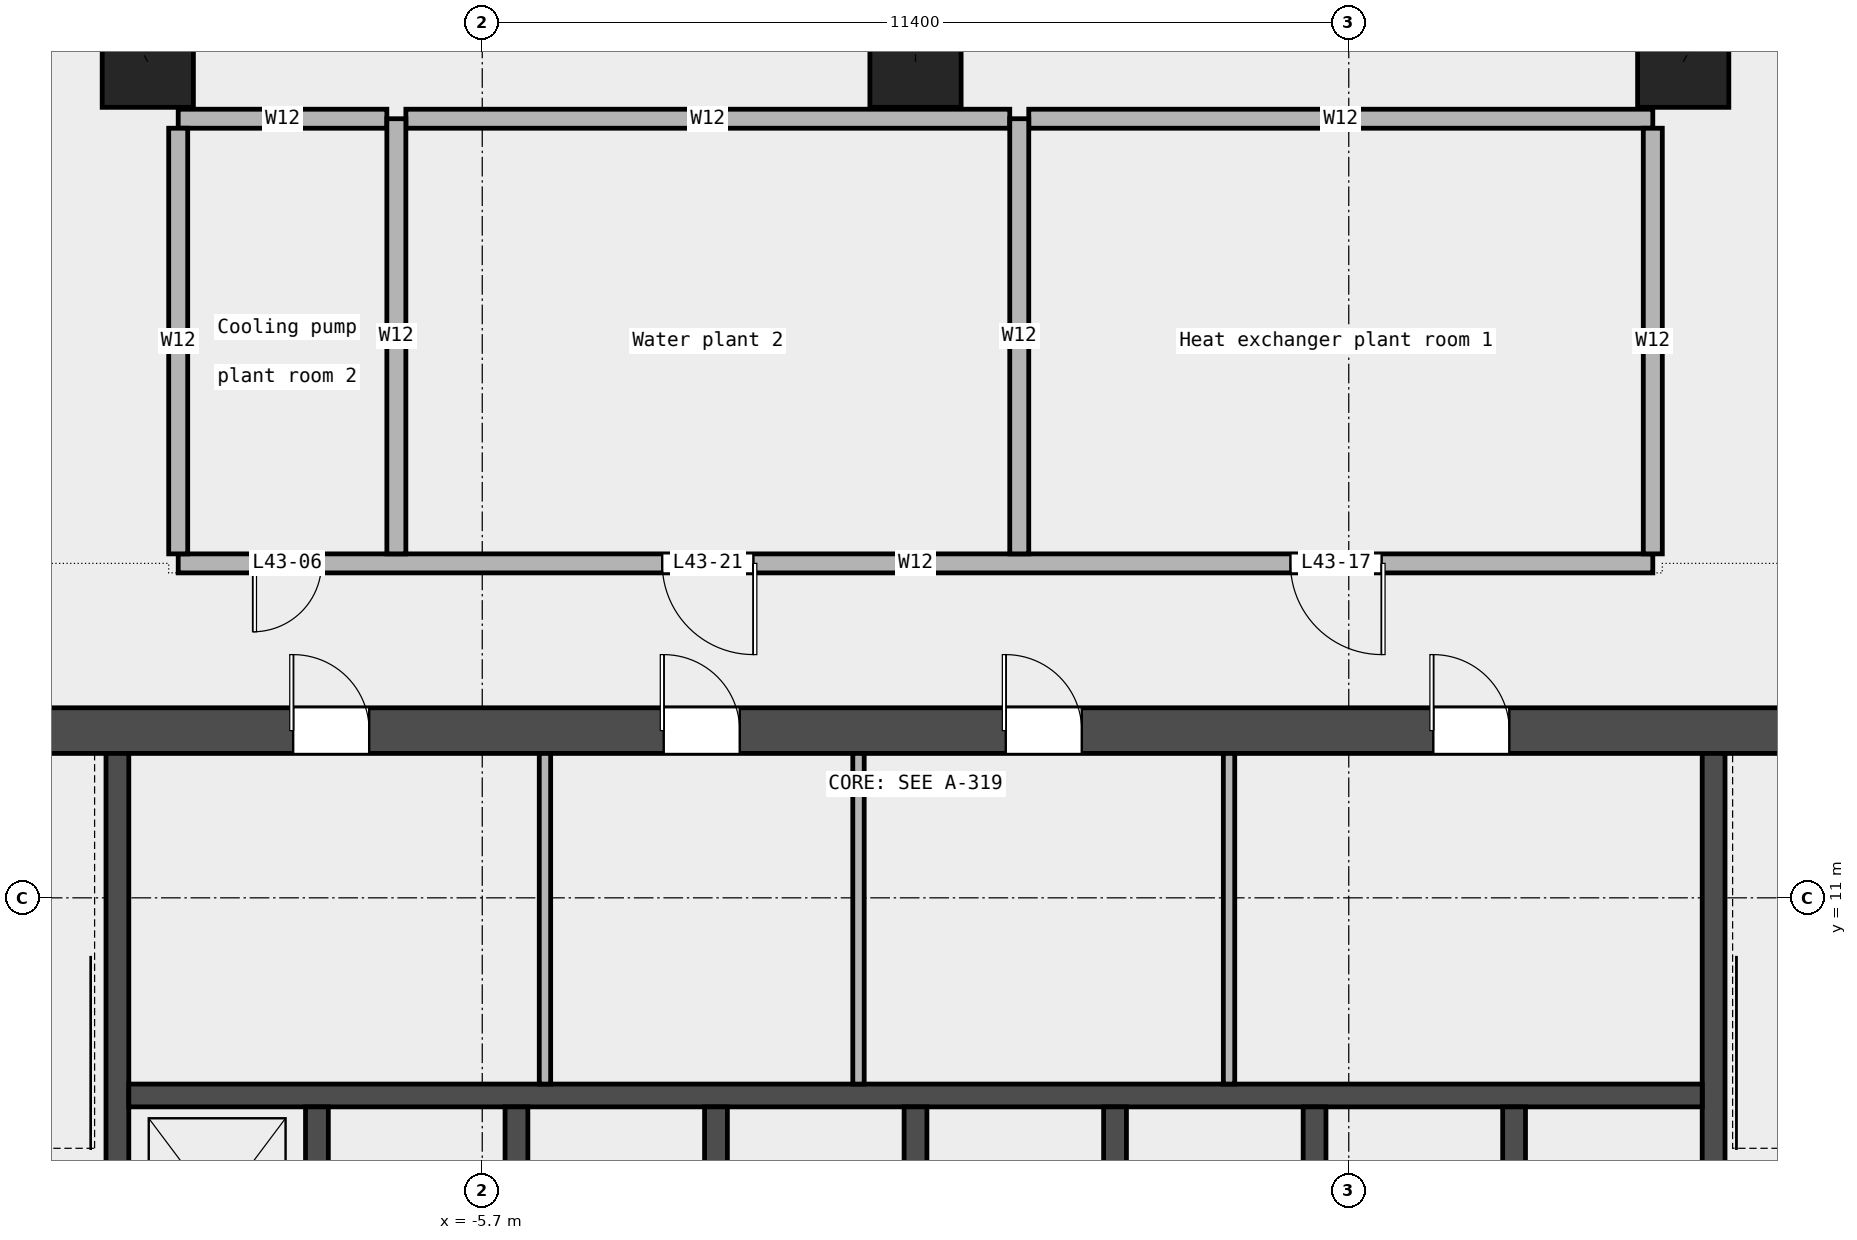
"""IFC4 building model, lengths in metres.
Left out: names, types, materials, properties, quantities, classifications, styles, units other than length and angle.
Written with IfcOpenShell. Run it as: python <this file> out.ifc"""

import sys

from ifc_helpers import new_model, si_unit, direction, frame, frame_2d, origin, origin_2d, place, context, subcontext, project, spatial, rectangle, extrude, element, fill, save


model = new_model("IFC4")
c1 = context("Model", 3, precision=1e-05, world=origin(), true_north=direction((0.0, 1.0)))
c2 = subcontext(c1, "Body", "Model", "MODEL_VIEW")
j1 = project(units=[si_unit("LENGTHUNIT", "METRE"), si_unit("PLANEANGLEUNIT", "RADIAN")], contexts=[c1])
p1 = place(None, origin())
s1 = spatial("IfcSite", under=j1, at=p1, CompositionType="ELEMENT")
p2 = place(p1, origin())
s2 = spatial("IfcBuilding", under=s1, at=p2, CompositionType="ELEMENT")
p3 = place(p2, frame((0.0, 0.0, 205.0)))
s3 = spatial("IfcBuildingStorey", under=s2, at=p3, CompositionType="ELEMENT", Elevation=205.0)
p4 = place(p3, frame((10.1, 22.0, 0.0), z_axis=(0.157990952402, 0.276473835095, 0.947945714409), x_axis=(-0.868235155486, 0.496152914712, 0.0)))
e1 = element("IfcColumn", 1, at=p4, inside=s3, PredefinedType="COLUMN", context=c2, shape_type="SweptSolid", body=[
    extrude(rectangle(XDim=1.2, YDim=1.2, at=origin_2d()), origin(), (0.0, 0.0, 1.0), 5.908),
])
p5 = place(p3, frame((0.0, 22.0, 0.0), z_axis=(0.0, 0.279990357269, 0.960002812411), x_axis=(-1.0, 0.0, 0.0)))
e2 = element("IfcColumn", 2, at=p5, inside=s3, PredefinedType="COLUMN", context=c2, shape_type="SweptSolid", body=[
    extrude(rectangle(XDim=1.2, YDim=1.2, at=origin_2d()), origin(), (0.0, 0.0, 1.0), 5.833),
])
p6 = place(p3, frame((-10.1, 22.0, 0.0), z_axis=(-0.157990952402, 0.276473835095, 0.947945714409), x_axis=(-0.868235155486, -0.496152914712, 0.0)))
e3 = element("IfcColumn", 3, at=p6, inside=s3, PredefinedType="COLUMN", context=c2, shape_type="SweptSolid", body=[
    extrude(rectangle(XDim=1.2, YDim=1.2, at=origin_2d()), origin(), (0.0, 0.0, 1.0), 5.908),
])
p7 = place(p3, frame((-9.7, 15.4, 0.0), z_axis=(0.0, 0.0, 1.0), x_axis=(1.0, 0.0, 0.0)))
e4 = element("IfcWall", 4, at=p7, inside=s3, PredefinedType="PARTITIONING", context=c2, shape_type="SweptSolid", body=[
    extrude(rectangle(XDim=19.4, YDim=0.25, at=frame_2d((9.7, 0.0))), origin(), (0.0, 0.0, 1.0), 5.6),
])
p8 = place(p7, frame((0.985, 0.0, 0.0)))
e5 = element("IfcOpeningElement", 5, at=p8, cuts=e4, PredefinedType="OPENING", context=c2, shape_type="SweptSolid", body=[
    extrude(rectangle(XDim=0.9, YDim=2.1, at=frame_2d((0.45, 1.05))), frame((0.0, 0.137, 0.0), z_axis=(0.0, -1.0, 0.0), x_axis=(1.0, 0.0, 0.0)), (0.0, 0.0, 1.0), 0.274),
])
p9 = place(p7, frame((14.633, 0.0, 0.0)))
e6 = element("IfcOpeningElement", 6, at=p9, cuts=e4, PredefinedType="OPENING", context=c2, shape_type="SweptSolid", body=[
    extrude(rectangle(XDim=1.2, YDim=2.1, at=frame_2d((0.6, 1.05))), frame((0.0, 0.137, 0.0), z_axis=(0.0, -1.0, 0.0), x_axis=(1.0, 0.0, 0.0)), (0.0, 0.0, 1.0), 0.274),
])
p10 = place(p7, frame((6.367, 0.0, 0.0)))
e7 = element("IfcOpeningElement", 7, at=p10, cuts=e4, PredefinedType="OPENING", context=c2, shape_type="SweptSolid", body=[
    extrude(rectangle(XDim=1.2, YDim=2.1, at=frame_2d((0.6, 1.05))), frame((0.0, 0.137, 0.0), z_axis=(0.0, -1.0, 0.0), x_axis=(1.0, 0.0, 0.0)), (0.0, 0.0, 1.0), 0.274),
])
p11 = place(p3, frame((-9.7, 21.25, 0.0), z_axis=(0.0, 0.0, 1.0), x_axis=(1.0, 0.0, 0.0)))
e8 = element("IfcWall", 8, at=p11, inside=s3, PredefinedType="PARTITIONING", context=c2, shape_type="SweptSolid", body=[
    extrude(rectangle(XDim=2.745, YDim=0.25, at=frame_2d((1.373, 0.0))), origin(), (0.0, 0.0, 1.0), 5.6),
])
p12 = place(p3, frame((-6.705, 21.25, 0.0), z_axis=(0.0, 0.0, 1.0), x_axis=(1.0, 0.0, 0.0)))
e9 = element("IfcWall", 9, at=p12, inside=s3, PredefinedType="PARTITIONING", context=c2, shape_type="SweptSolid", body=[
    extrude(rectangle(XDim=7.945, YDim=0.25, at=frame_2d((3.973, 0.0))), origin(), (0.0, 0.0, 1.0), 5.6),
])
p13 = place(p3, frame((1.49, 21.25, 0.0), z_axis=(0.0, 0.0, 1.0), x_axis=(1.0, 0.0, 0.0)))
e10 = element("IfcWall", 10, at=p13, inside=s3, PredefinedType="PARTITIONING", context=c2, shape_type="SweptSolid", body=[
    extrude(rectangle(XDim=8.21, YDim=0.25, at=frame_2d((4.105, 0.0))), origin(), (0.0, 0.0, 1.0), 5.6),
])
p14 = place(p3, frame((-9.7, 15.525, 0.0), z_axis=(0.0, 0.0, 1.0), x_axis=(0.0, 1.0, 0.0)))
e11 = element("IfcWall", 11, at=p14, inside=s3, PredefinedType="PARTITIONING", context=c2, shape_type="SweptSolid", body=[
    extrude(rectangle(XDim=5.6, YDim=0.25, at=frame_2d((2.8, 0.0))), origin(), (0.0, 0.0, 1.0), 5.6),
])
for number, where, z_axis, x_axis in (
    (12, (-6.83, 15.525, 0.0), (0.0, 0.0, 1.0), (0.0, 1.0, 0.0)),
    (13, (1.365, 15.525, 0.0), (0.0, 0.0, 1.0), (0.0, 1.0, 0.0)),
):
    element("IfcWall", number, at=place(p3, frame(where, z_axis=z_axis, x_axis=x_axis)), inside=s3, PredefinedType="PARTITIONING", context=c2, shape_type="SweptSolid", body=[
        extrude(rectangle(XDim=5.725, YDim=0.25, at=frame_2d((2.863, 0.0))), origin(), (0.0, 0.0, 1.0), 5.6),
    ])
p15 = place(p3, frame((9.7, 15.525, 0.0), z_axis=(0.0, 0.0, 1.0), x_axis=(0.0, 1.0, 0.0)))
e14 = element("IfcWall", 14, at=p15, inside=s3, PredefinedType="PARTITIONING", context=c2, shape_type="SweptSolid", body=[
    extrude(rectangle(XDim=5.6, YDim=0.25, at=frame_2d((2.8, 0.0))), origin(), (0.0, 0.0, 1.0), 5.6),
])
p16 = place(p3, frame((-14.4, 13.2, 0.0), z_axis=(0.0, 0.0, 1.0), x_axis=(1.0, 0.0, 0.0)))
e15 = element("IfcWall", 15, at=p16, inside=s3, PredefinedType="SHEAR", context=c2, shape_type="SweptSolid", body=[
    extrude(rectangle(XDim=28.8, YDim=0.6, at=frame_2d((14.4, 0.0))), origin(), (0.0, 0.0, 1.0), 5.7),
])
p17 = place(p16, frame((6.212, 0.0, 0.0)))
e16 = element("IfcOpeningElement", 16, at=p17, cuts=e15, PredefinedType="OPENING", context=c2, shape_type="SweptSolid", body=[
    extrude(rectangle(XDim=1.0, YDim=2.1, at=frame_2d((0.5, 1.05))), frame((0.0, 0.312, 0.0), z_axis=(0.0, -1.0, 0.0), x_axis=(1.0, 0.0, 0.0)), (0.0, 0.0, 1.0), 0.624),
])
p18 = place(p16, frame((11.087, 0.0, 0.0)))
e17 = element("IfcOpeningElement", 17, at=p18, cuts=e15, PredefinedType="OPENING", context=c2, shape_type="SweptSolid", body=[
    extrude(rectangle(XDim=1.0, YDim=2.1, at=frame_2d((0.5, 1.05))), frame((0.0, 0.312, 0.0), z_axis=(0.0, -1.0, 0.0), x_axis=(1.0, 0.0, 0.0)), (0.0, 0.0, 1.0), 0.624),
])
p19 = place(p16, frame((15.587, 0.0, 0.0)))
e18 = element("IfcOpeningElement", 18, at=p19, cuts=e15, PredefinedType="OPENING", context=c2, shape_type="SweptSolid", body=[
    extrude(rectangle(XDim=1.0, YDim=2.1, at=frame_2d((0.5, 1.05))), frame((0.0, 0.312, 0.0), z_axis=(0.0, -1.0, 0.0), x_axis=(1.0, 0.0, 0.0)), (0.0, 0.0, 1.0), 0.624),
])
p20 = place(p16, frame((21.212, 0.0, 0.0)))
e19 = element("IfcOpeningElement", 19, at=p20, cuts=e15, PredefinedType="OPENING", context=c2, shape_type="SweptSolid", body=[
    extrude(rectangle(XDim=1.0, YDim=2.1, at=frame_2d((0.5, 1.05))), frame((0.0, 0.312, 0.0), z_axis=(0.0, -1.0, 0.0), x_axis=(1.0, 0.0, 0.0)), (0.0, 0.0, 1.0), 0.624),
])
for number, where, z_axis, x_axis in (
    (20, (-10.5, 5.25, 0.0), (0.0, 0.0, 1.0), (0.0, 1.0, 0.0)),
    (21, (10.5, 5.25, 0.0), (0.0, 0.0, 1.0), (0.0, 1.0, 0.0)),
):
    element("IfcWall", number, at=place(p3, frame(where, z_axis=z_axis, x_axis=x_axis)), inside=s3, PredefinedType="SHEAR", context=c2, shape_type="SweptSolid", body=[
        extrude(rectangle(XDim=7.65, YDim=0.3, at=frame_2d((3.825, 0.0))), origin(), (0.0, 0.0, 1.0), 5.7),
    ])
p21 = place(p3, frame((-10.35, 8.4, 0.0), z_axis=(0.0, 0.0, 1.0), x_axis=(1.0, 0.0, 0.0)))
e22 = element("IfcWall", 22, at=p21, inside=s3, PredefinedType="SOLIDWALL", context=c2, shape_type="SweptSolid", body=[
    extrude(rectangle(XDim=20.7, YDim=0.3, at=frame_2d((10.35, 0.0))), origin(), (0.0, 0.0, 1.0), 5.7),
])
for number, where, z_axis, x_axis in (
    (23, (-7.875, 5.55, 0.0), (0.0, 0.0, 1.0), (0.0, 1.0, 0.0)),
    (24, (-5.25, 5.55, 0.0), (0.0, 0.0, 1.0), (0.0, 1.0, 0.0)),
    (25, (-2.625, 5.55, 0.0), (0.0, 0.0, 1.0), (0.0, 1.0, 0.0)),
    (26, (0.0, 5.55, 0.0), (0.0, 0.0, 1.0), (0.0, 1.0, 0.0)),
    (27, (2.625, 5.55, 0.0), (0.0, 0.0, 1.0), (0.0, 1.0, 0.0)),
    (28, (5.25, 5.55, 0.0), (0.0, 0.0, 1.0), (0.0, 1.0, 0.0)),
    (29, (7.875, 5.55, 0.0), (0.0, 0.0, 1.0), (0.0, 1.0, 0.0)),
):
    element("IfcWall", number, at=place(p3, frame(where, z_axis=z_axis, x_axis=x_axis)), inside=s3, PredefinedType="SOLIDWALL", context=c2, shape_type="SweptSolid", body=[
        extrude(rectangle(XDim=2.7, YDim=0.3, at=frame_2d((1.35, 0.0))), origin(), (0.0, 0.0, 1.0), 5.7),
    ])
for number, where, z_axis, x_axis in (
    (30, (-4.875, 8.55, 0.0), (0.0, 0.0, 1.0), (0.0, 1.0, 0.0)),
    (31, (-0.75, 8.55, 0.0), (0.0, 0.0, 1.0), (0.0, 1.0, 0.0)),
    (32, (4.125, 8.55, 0.0), (0.0, 0.0, 1.0), (0.0, 1.0, 0.0)),
):
    element("IfcWall", number, at=place(p3, frame(where, z_axis=z_axis, x_axis=x_axis)), inside=s3, PredefinedType="PARTITIONING", context=c2, shape_type="SweptSolid", body=[
        extrude(rectangle(XDim=4.35, YDim=0.15, at=frame_2d((2.175, 0.0))), origin(), (0.0, 0.0, 1.0), 5.7),
    ])
p22 = place(p8, origin())
e33 = element("IfcDoor", 33, at=p22, inside=s3, OperationType="SINGLE_SWING_RIGHT", PredefinedType="DOOR", context=c2, shape_type="SweptSolid", body=[
    extrude(rectangle(XDim=0.9, YDim=2.1, at=frame_2d((0.45, 1.05))), frame((0.0, 0.025, 0.0), z_axis=(0.0, -1.0, 0.0), x_axis=(1.0, 0.0, 0.0)), (0.0, 0.0, 1.0), 0.05),
])
fill(e5, e33)
p23 = place(p9, origin())
e34 = element("IfcDoor", 34, at=p23, inside=s3, OperationType="SINGLE_SWING_LEFT", PredefinedType="DOOR", context=c2, shape_type="SweptSolid", body=[
    extrude(rectangle(XDim=1.2, YDim=2.1, at=frame_2d((0.6, 1.05))), frame((0.0, 0.025, 0.0), z_axis=(0.0, -1.0, 0.0), x_axis=(1.0, 0.0, 0.0)), (0.0, 0.0, 1.0), 0.05),
])
fill(e6, e34)
p24 = place(p10, origin())
e35 = element("IfcDoor", 35, at=p24, inside=s3, OperationType="SINGLE_SWING_LEFT", PredefinedType="DOOR", context=c2, shape_type="SweptSolid", body=[
    extrude(rectangle(XDim=1.2, YDim=2.1, at=frame_2d((0.6, 1.05))), frame((0.0, 0.025, 0.0), z_axis=(0.0, -1.0, 0.0), x_axis=(1.0, 0.0, 0.0)), (0.0, 0.0, 1.0), 0.05),
])
fill(e7, e35)
p25 = place(p17, origin())
e36 = element("IfcDoor", 36, at=p25, inside=s3, OperationType="SINGLE_SWING_LEFT", PredefinedType="DOOR", context=c2, shape_type="SweptSolid", body=[
    extrude(rectangle(XDim=1.0, YDim=2.1, at=frame_2d((0.5, 1.05))), frame((0.0, 0.025, 0.0), z_axis=(0.0, -1.0, 0.0), x_axis=(1.0, 0.0, 0.0)), (0.0, 0.0, 1.0), 0.05),
])
fill(e16, e36)
p26 = place(p18, origin())
e37 = element("IfcDoor", 37, at=p26, inside=s3, OperationType="SINGLE_SWING_LEFT", PredefinedType="DOOR", context=c2, shape_type="SweptSolid", body=[
    extrude(rectangle(XDim=1.0, YDim=2.1, at=frame_2d((0.5, 1.05))), frame((0.0, 0.025, 0.0), z_axis=(0.0, -1.0, 0.0), x_axis=(1.0, 0.0, 0.0)), (0.0, 0.0, 1.0), 0.05),
])
fill(e17, e37)
p27 = place(p19, origin())
e38 = element("IfcDoor", 38, at=p27, inside=s3, OperationType="SINGLE_SWING_LEFT", PredefinedType="DOOR", context=c2, shape_type="SweptSolid", body=[
    extrude(rectangle(XDim=1.0, YDim=2.1, at=frame_2d((0.5, 1.05))), frame((0.0, 0.025, 0.0), z_axis=(0.0, -1.0, 0.0), x_axis=(1.0, 0.0, 0.0)), (0.0, 0.0, 1.0), 0.05),
])
fill(e18, e38)
p28 = place(p20, origin())
e39 = element("IfcDoor", 39, at=p28, inside=s3, OperationType="SINGLE_SWING_LEFT", PredefinedType="DOOR", context=c2, shape_type="SweptSolid", body=[
    extrude(rectangle(XDim=1.0, YDim=2.1, at=frame_2d((0.5, 1.05))), frame((0.0, 0.025, 0.0), z_axis=(0.0, -1.0, 0.0), x_axis=(1.0, 0.0, 0.0)), (0.0, 0.0, 1.0), 0.05),
])
fill(e19, e39)
save(model, sys.argv[1])
